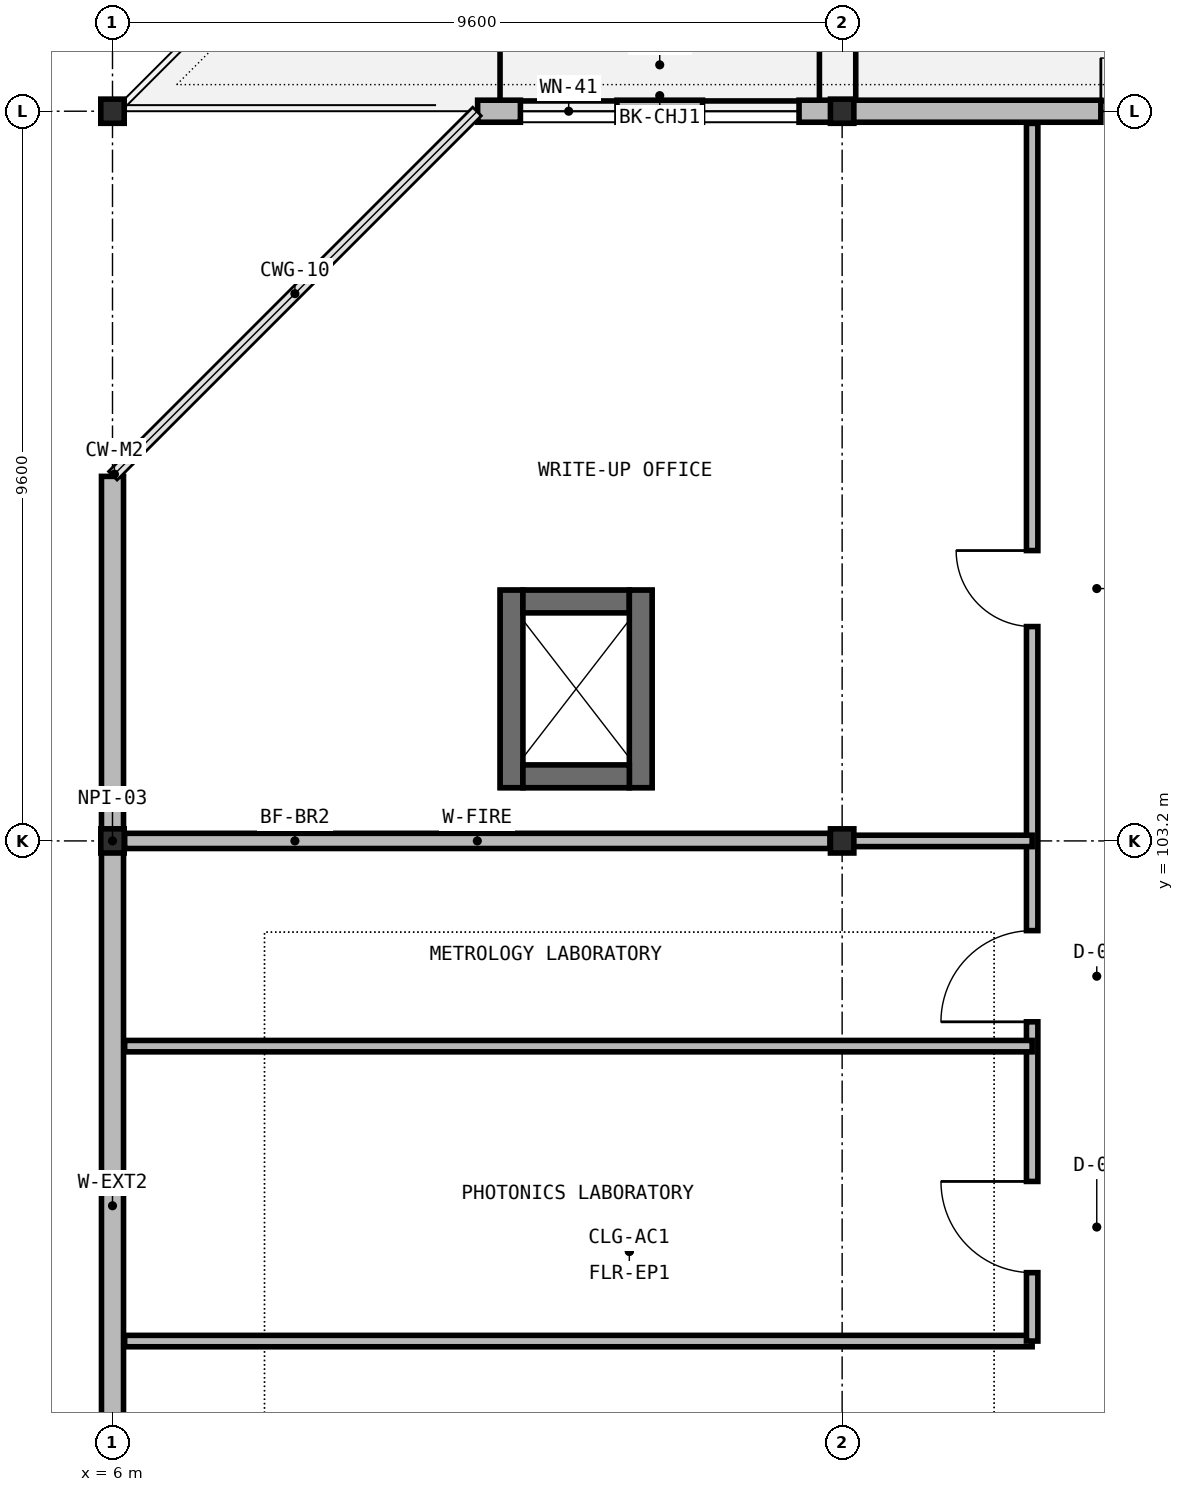
"""IFC4 building model, lengths in metres.
Left out: names, types, materials, properties, quantities, classifications, styles, units other than length and angle.
Written with IfcOpenShell. Run it as: python <this file> out.ifc"""

import sys

from ifc_helpers import new_model, si_unit, direction, frame, frame_2d, origin, origin_2d, place, context, subcontext, project, spatial, rectangle, i_section, extrude, element, fill, save


model = new_model("IFC4")
c1 = context("Model", 3, precision=1e-05, world=origin(), true_north=direction((0.0, 1.0)))
c2 = subcontext(c1, "Body", "Model", "MODEL_VIEW")
j1 = project(units=[si_unit("LENGTHUNIT", "METRE"), si_unit("PLANEANGLEUNIT", "RADIAN")], contexts=[c1])
p1 = place(None, origin())
s1 = spatial("IfcSite", under=j1, at=p1, CompositionType="ELEMENT")
p2 = place(p1, origin())
s2 = spatial("IfcBuilding", under=s1, at=p2, CompositionType="ELEMENT")
p3 = place(p2, frame((0.0, 0.0, 23.45)))
s3 = spatial("IfcBuildingStorey", under=s2, at=p3, CompositionType="ELEMENT", Elevation=23.45)
for number, where, z_axis, x_axis in (
    (1, (6.0, 103.2, 0.0), (0.0, 0.0, 1.0), (1.0, 0.0, 0.0)),
    (2, (6.0, 112.8, 0.0), (0.0, 0.0, 1.0), (1.0, 0.0, 0.0)),
    (3, (15.6, 103.2, 0.0), (0.0, 0.0, 1.0), (1.0, 0.0, 0.0)),
    (4, (15.6, 112.8, 0.0), (0.0, 0.0, 1.0), (1.0, 0.0, 0.0)),
):
    element("IfcColumn", number, at=place(p3, frame(where, z_axis=z_axis, x_axis=x_axis)), inside=s3, PredefinedType="COLUMN", context=c2, shape_type="SweptSolid", body=[
        extrude(i_section(OverallWidth=0.308, OverallDepth=0.318, WebThickness=0.013, FlangeThickness=0.021, at=origin_2d()), origin(), (0.0, 0.0, 1.0), 4.55),
    ])
p4 = place(p3, frame((11.25, 103.9, 0.0), z_axis=(0.0, 0.0, 1.0), x_axis=(0.0, 1.0, 0.0)))
e5 = element("IfcWall", 5, at=p4, inside=s3, PredefinedType="SHEAR", context=c2, shape_type="SweptSolid", body=[
    extrude(rectangle(XDim=2.6, YDim=0.3, at=frame_2d((1.3, 0.0))), origin(), (0.0, 0.0, 1.0), 4.37),
])
p5 = place(p3, frame((11.4, 106.35, 0.0), z_axis=(0.0, 0.0, 1.0), x_axis=(1.0, 0.0, 0.0)))
e6 = element("IfcWall", 6, at=p5, inside=s3, PredefinedType="SHEAR", context=c2, shape_type="SweptSolid", body=[
    extrude(rectangle(XDim=1.4, YDim=0.3, at=frame_2d((0.7, 0.0))), origin(), (0.0, 0.0, 1.0), 4.37),
])
p6 = place(p3, frame((12.95, 106.5, 0.0), z_axis=(0.0, 0.0, 1.0), x_axis=(0.0, -1.0, 0.0)))
e7 = element("IfcWall", 7, at=p6, inside=s3, PredefinedType="SHEAR", context=c2, shape_type="SweptSolid", body=[
    extrude(rectangle(XDim=2.6, YDim=0.3, at=frame_2d((1.3, 0.0))), origin(), (0.0, 0.0, 1.0), 4.37),
])
p7 = place(p3, frame((12.8, 104.05, 0.0), z_axis=(0.0, 0.0, 1.0), x_axis=(-1.0, 0.0, 0.0)))
e8 = element("IfcWall", 8, at=p7, inside=s3, PredefinedType="SHEAR", context=c2, shape_type="SweptSolid", body=[
    extrude(rectangle(XDim=1.4, YDim=0.3, at=frame_2d((0.7, 0.0))), origin(), (0.0, 0.0, 1.0), 4.37),
])
p8 = place(p3, frame((6.0, 93.604, 0.0), z_axis=(0.0, 0.0, 1.0), x_axis=(0.0, 1.0, 0.0)))
e9 = element("IfcWall", 9, at=p8, inside=s3, PredefinedType="SOLIDWALL", context=c2, shape_type="SweptSolid", body=[
    extrude(rectangle(XDim=9.592, YDim=0.29, at=frame_2d((4.796, 0.0))), origin(), (0.0, 0.0, 1.0), 3.822),
])
p9 = place(p3, frame((6.0, 103.204, 0.0), z_axis=(0.0, 0.0, 1.0), x_axis=(0.0, 1.0, 0.0)))
e10 = element("IfcWall", 10, at=p9, inside=s3, PredefinedType="SOLIDWALL", context=c2, shape_type="SweptSolid", body=[
    extrude(rectangle(XDim=4.792, YDim=0.29, at=frame_2d((2.396, 0.0))), origin(), (0.0, 0.0, 1.0), 3.822),
])
p10 = place(p3, frame((10.804, 112.8, 0.0), z_axis=(0.0, 0.0, 1.0), x_axis=(1.0, 0.0, 0.0)))
e11 = element("IfcWall", 11, at=p10, inside=s3, PredefinedType="SOLIDWALL", context=c2, shape_type="SweptSolid", body=[
    extrude(rectangle(XDim=4.792, YDim=0.29, at=frame_2d((2.396, 0.0))), origin(), (0.0, 0.0, 1.0), 3.75),
])
p11 = place(p10, frame((0.563, 0.0, 0.95)))
e12 = element("IfcOpeningElement", 12, at=p11, cuts=e11, PredefinedType="OPENING", context=c2, shape_type="SweptSolid", body=[
    extrude(rectangle(XDim=1.27, YDim=1.75, at=frame_2d((0.635, 0.875))), frame((0.0, 0.155, 0.0), z_axis=(0.0, -1.0, 0.0), x_axis=(1.0, 0.0, 0.0)), (0.0, 0.0, 1.0), 0.31),
])
p12 = place(p10, frame((2.959, 0.0, 0.95)))
e13 = element("IfcOpeningElement", 13, at=p12, cuts=e11, PredefinedType="OPENING", context=c2, shape_type="SweptSolid", body=[
    extrude(rectangle(XDim=1.27, YDim=1.75, at=frame_2d((0.635, 0.875))), frame((0.0, 0.155, 0.0), z_axis=(0.0, -1.0, 0.0), x_axis=(1.0, 0.0, 0.0)), (0.0, 0.0, 1.0), 0.31),
])
p13 = place(p3, frame((15.604, 112.8, 0.0), z_axis=(0.0, 0.0, 1.0), x_axis=(1.0, 0.0, 0.0)))
e14 = element("IfcWall", 14, at=p13, inside=s3, PredefinedType="SOLIDWALL", context=c2, shape_type="SweptSolid", body=[
    extrude(rectangle(XDim=9.592, YDim=0.29, at=frame_2d((4.796, 0.0))), origin(), (0.0, 0.0, 1.0), 3.75),
])
p14 = place(p13, frame((3.4, 0.0, 0.0)))
e15 = element("IfcOpeningElement", 15, at=p14, cuts=e14, PredefinedType="OPENING", context=c2, shape_type="SweptSolid", body=[
    extrude(rectangle(XDim=1.4, YDim=2.2, at=frame_2d((0.7, 1.1))), frame((0.0, 0.155, 0.0), z_axis=(0.0, -1.0, 0.0), x_axis=(1.0, 0.0, 0.0)), (0.0, 0.0, 1.0), 0.31),
])
p15 = place(p3, frame((6.16, 103.2, 0.0), z_axis=(0.0, 0.0, 1.0), x_axis=(1.0, 0.0, 0.0)))
e16 = element("IfcWall", 16, at=p15, inside=s3, PredefinedType="SOLIDWALL", context=c2, shape_type="SweptSolid", body=[
    extrude(rectangle(XDim=9.28, YDim=0.2, at=frame_2d((4.64, 0.0))), origin(), (0.0, 0.0, 1.0), 3.754),
])
p16 = place(p3, frame((6.16, 96.62, 0.0), z_axis=(0.0, 0.0, 1.0), x_axis=(1.0, 0.0, 0.0)))
e17 = element("IfcWall", 17, at=p16, inside=s3, PredefinedType="PARTITIONING", context=c2, shape_type="SweptSolid", body=[
    extrude(rectangle(XDim=11.94, YDim=0.15, at=frame_2d((5.97, 0.0))), origin(), (0.0, 0.0, 1.0), 4.3),
])
p17 = place(p3, frame((18.1, 96.62, 0.0), z_axis=(0.0, 0.0, 1.0), x_axis=(0.0, 1.0, 0.0)))
e18 = element("IfcWall", 18, at=p17, inside=s3, PredefinedType="PARTITIONING", context=c2, shape_type="SweptSolid", body=[
    extrude(rectangle(XDim=16.02, YDim=0.15, at=frame_2d((8.01, 0.0))), origin(), (0.0, 0.0, 1.0), 4.3),
])
p18 = place(p17, frame((0.9, 0.0, 0.0)))
e19 = element("IfcOpeningElement", 19, at=p18, cuts=e18, PredefinedType="OPENING", context=c2, shape_type="SweptSolid", body=[
    extrude(rectangle(XDim=1.2, YDim=2.2, at=frame_2d((0.6, 1.1))), frame((0.0, 0.085, 0.0), z_axis=(0.0, -1.0, 0.0), x_axis=(1.0, 0.0, 0.0)), (0.0, 0.0, 1.0), 0.17),
])
p19 = place(p17, frame((4.2, 0.0, 0.0)))
e20 = element("IfcOpeningElement", 20, at=p19, cuts=e18, PredefinedType="OPENING", context=c2, shape_type="SweptSolid", body=[
    extrude(rectangle(XDim=1.2, YDim=2.2, at=frame_2d((0.6, 1.1))), frame((0.0, 0.085, 0.0), z_axis=(0.0, -1.0, 0.0), x_axis=(1.0, 0.0, 0.0)), (0.0, 0.0, 1.0), 0.17),
])
p20 = place(p17, frame((9.4, 0.0, 0.0)))
e21 = element("IfcOpeningElement", 21, at=p20, cuts=e18, PredefinedType="OPENING", context=c2, shape_type="SweptSolid", body=[
    extrude(rectangle(XDim=1.0, YDim=2.2, at=frame_2d((0.5, 1.1))), frame((0.0, 0.085, 0.0), z_axis=(0.0, -1.0, 0.0), x_axis=(1.0, 0.0, 0.0)), (0.0, 0.0, 1.0), 0.17),
])
p21 = place(p3, frame((6.16, 100.5, 0.0), z_axis=(0.0, 0.0, 1.0), x_axis=(1.0, 0.0, 0.0)))
e22 = element("IfcWall", 22, at=p21, inside=s3, PredefinedType="PARTITIONING", context=c2, shape_type="SweptSolid", body=[
    extrude(rectangle(XDim=11.94, YDim=0.15, at=frame_2d((5.97, 0.0))), origin(), (0.0, 0.0, 1.0), 4.3),
])
p22 = place(p3, frame((15.55, 103.2, 0.0), z_axis=(0.0, 0.0, 1.0), x_axis=(1.0, 0.0, 0.0)))
e23 = element("IfcWall", 23, at=p22, inside=s3, PredefinedType="PARTITIONING", context=c2, shape_type="SweptSolid", body=[
    extrude(rectangle(XDim=2.55, YDim=0.15, at=frame_2d((1.275, 0.0))), origin(), (0.0, 0.0, 1.0), 3.754),
])
p23 = place(p11, origin())
e24 = element("IfcWindow", 24, at=p23, inside=s3, PartitioningType="SINGLE_PANEL", PredefinedType="WINDOW", context=c2, shape_type="SweptSolid", body=[
    extrude(rectangle(XDim=1.27, YDim=1.75, at=frame_2d((0.635, 0.875))), frame((0.0, 0.03, 0.0), z_axis=(0.0, -1.0, 0.0), x_axis=(1.0, 0.0, 0.0)), (0.0, 0.0, 1.0), 0.06),
])
fill(e12, e24)
p24 = place(p12, origin())
e25 = element("IfcWindow", 25, at=p24, inside=s3, PartitioningType="SINGLE_PANEL", PredefinedType="WINDOW", context=c2, shape_type="SweptSolid", body=[
    extrude(rectangle(XDim=1.27, YDim=1.75, at=frame_2d((0.635, 0.875))), frame((0.0, 0.03, 0.0), z_axis=(0.0, -1.0, 0.0), x_axis=(1.0, 0.0, 0.0)), (0.0, 0.0, 1.0), 0.06),
])
fill(e13, e25)
p25 = place(p14, origin())
e26 = element("IfcDoor", 26, at=p25, inside=s3, OperationType="DOUBLE_DOOR_SINGLE_SWING", PredefinedType="DOOR", context=c2, shape_type="SweptSolid", body=[
    extrude(rectangle(XDim=1.4, YDim=2.2, at=frame_2d((0.7, 1.1))), frame((0.0, 0.025, 0.0), z_axis=(0.0, -1.0, 0.0), x_axis=(1.0, 0.0, 0.0)), (0.0, 0.0, 1.0), 0.05),
])
fill(e15, e26)
p26 = place(p18, origin())
e27 = element("IfcDoor", 27, at=p26, inside=s3, OperationType="SINGLE_SWING_RIGHT", PredefinedType="DOOR", context=c2, shape_type="SweptSolid", body=[
    extrude(rectangle(XDim=1.2, YDim=2.2, at=frame_2d((0.6, 1.1))), frame((0.0, 0.025, 0.0), z_axis=(0.0, -1.0, 0.0), x_axis=(1.0, 0.0, 0.0)), (0.0, 0.0, 1.0), 0.05),
])
fill(e19, e27)
p27 = place(p19, origin())
e28 = element("IfcDoor", 28, at=p27, inside=s3, OperationType="SINGLE_SWING_LEFT", PredefinedType="DOOR", context=c2, shape_type="SweptSolid", body=[
    extrude(rectangle(XDim=1.2, YDim=2.2, at=frame_2d((0.6, 1.1))), frame((0.0, 0.025, 0.0), z_axis=(0.0, -1.0, 0.0), x_axis=(1.0, 0.0, 0.0)), (0.0, 0.0, 1.0), 0.05),
])
fill(e20, e28)
p28 = place(p20, origin())
e29 = element("IfcDoor", 29, at=p28, inside=s3, OperationType="SINGLE_SWING_RIGHT", PredefinedType="DOOR", context=c2, shape_type="SweptSolid", body=[
    extrude(rectangle(XDim=1.0, YDim=2.2, at=frame_2d((0.5, 1.1))), frame((0.0, 0.025, 0.0), z_axis=(0.0, -1.0, 0.0), x_axis=(1.0, 0.0, 0.0)), (0.0, 0.0, 1.0), 0.05),
])
fill(e21, e29)
save(model, sys.argv[1])
